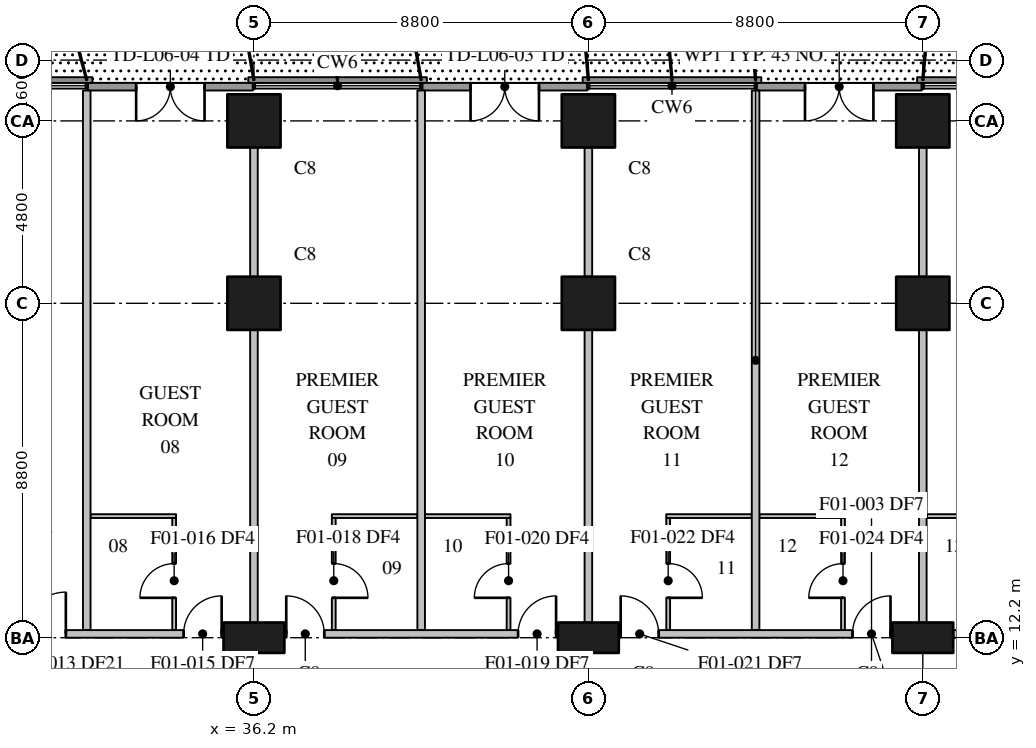
"""IFC4 building model, lengths in metres.
Left out: names, types, materials, properties, quantities, classifications, styles, units other than length and angle.
Written with IfcOpenShell. Run it as: python <this file> out.ifc"""

import sys

from ifc_helpers import new_model, si_unit, direction, frame, frame_2d, origin, origin_2d, place, context, subcontext, project, spatial, rectangle, extrude, element, fill, save


model = new_model("IFC4")
c1 = context("Model", 3, precision=1e-05, world=origin(), true_north=direction((0.0, 1.0)))
c2 = subcontext(c1, "Body", "Model", "MODEL_VIEW")
j1 = project(units=[si_unit("LENGTHUNIT", "METRE"), si_unit("PLANEANGLEUNIT", "RADIAN")], contexts=[c1])
p1 = place(None, origin())
s1 = spatial("IfcSite", under=j1, at=p1, CompositionType="ELEMENT")
p2 = place(p1, origin())
s2 = spatial("IfcBuilding", under=s1, at=p2, CompositionType="ELEMENT")
p3 = place(p2, frame((0.0, 0.0, 34.0)))
s3 = spatial("IfcBuildingStorey", under=s2, at=p3, CompositionType="ELEMENT", Elevation=34.0)
p4 = place(p3, frame((36.2, 12.2, 0.0), z_axis=(0.0, 0.0, 1.0), x_axis=(1.0, 0.0, 0.0)))
e1 = element("IfcColumn", 1, at=p4, inside=s3, PredefinedType="COLUMN", context=c2, shape_type="SweptSolid", body=[
    extrude(rectangle(XDim=1.6, YDim=0.8, at=origin_2d()), origin(), (0.0, 0.0, 1.0), 3.7),
])
for number, where, z_axis, x_axis in (
    (2, (36.2, 21.0, 0.0), (0.0, 0.0, 1.0), (1.0, 0.0, 0.0)),
    (3, (36.2, 25.8, 0.0), (0.0, 0.0, 1.0), (1.0, 0.0, 0.0)),
):
    element("IfcColumn", number, at=place(p3, frame(where, z_axis=z_axis, x_axis=x_axis)), inside=s3, PredefinedType="COLUMN", context=c2, shape_type="SweptSolid", body=[
        extrude(rectangle(XDim=1.4, YDim=1.4, at=origin_2d()), origin(), (0.0, 0.0, 1.0), 3.7),
    ])
p5 = place(p3, frame((45.0, 12.2, 0.0), z_axis=(0.0, 0.0, 1.0), x_axis=(1.0, 0.0, 0.0)))
e4 = element("IfcColumn", 4, at=p5, inside=s3, PredefinedType="COLUMN", context=c2, shape_type="SweptSolid", body=[
    extrude(rectangle(XDim=1.6, YDim=0.8, at=origin_2d()), origin(), (0.0, 0.0, 1.0), 3.7),
])
for number, where, z_axis, x_axis in (
    (5, (45.0, 21.0, 0.0), (0.0, 0.0, 1.0), (1.0, 0.0, 0.0)),
    (6, (45.0, 25.8, 0.0), (0.0, 0.0, 1.0), (1.0, 0.0, 0.0)),
):
    element("IfcColumn", number, at=place(p3, frame(where, z_axis=z_axis, x_axis=x_axis)), inside=s3, PredefinedType="COLUMN", context=c2, shape_type="SweptSolid", body=[
        extrude(rectangle(XDim=1.4, YDim=1.4, at=origin_2d()), origin(), (0.0, 0.0, 1.0), 3.7),
    ])
p6 = place(p3, frame((53.8, 12.2, 0.0), z_axis=(0.0, 0.0, 1.0), x_axis=(1.0, 0.0, 0.0)))
e7 = element("IfcColumn", 7, at=p6, inside=s3, PredefinedType="COLUMN", context=c2, shape_type="SweptSolid", body=[
    extrude(rectangle(XDim=1.6, YDim=0.8, at=origin_2d()), origin(), (0.0, 0.0, 1.0), 3.7),
])
for number, where, z_axis, x_axis in (
    (8, (53.8, 21.0, 0.0), (0.0, 0.0, 1.0), (1.0, 0.0, 0.0)),
    (9, (53.8, 25.8, 0.0), (0.0, 0.0, 1.0), (1.0, 0.0, 0.0)),
):
    element("IfcColumn", number, at=place(p3, frame(where, z_axis=z_axis, x_axis=x_axis)), inside=s3, PredefinedType="COLUMN", context=c2, shape_type="SweptSolid", body=[
        extrude(rectangle(XDim=1.4, YDim=1.4, at=origin_2d()), origin(), (0.0, 0.0, 1.0), 3.7),
    ])
p7 = place(p3, frame((53.77, 26.7, 0.0), z_axis=(0.0, 0.0, 1.0), x_axis=(-1.0, 0.0, 0.0)))
e10 = element("IfcWall", 10, at=p7, inside=s3, PredefinedType="STANDARD", context=c2, shape_type="SweptSolid", body=[
    extrude(rectangle(XDim=4.34, YDim=0.2, at=frame_2d((2.17, 0.0))), origin(), (0.0, 0.0, 1.0), 3.4),
])
p8 = place(p7, frame((1.27, 0.0, 0.0)))
e11 = element("IfcOpeningElement", 11, at=p8, cuts=e10, PredefinedType="OPENING", context=c2, shape_type="SweptSolid", body=[
    extrude(rectangle(XDim=1.8, YDim=2.4, at=frame_2d((0.9, 1.2))), frame((0.0, 0.11, 0.0), z_axis=(0.0, -1.0, 0.0), x_axis=(1.0, 0.0, 0.0)), (0.0, 0.0, 1.0), 0.22),
])
p9 = place(p3, frame((44.97, 26.7, 0.0), z_axis=(0.0, 0.0, 1.0), x_axis=(-1.0, 0.0, 0.0)))
e12 = element("IfcWall", 12, at=p9, inside=s3, PredefinedType="STANDARD", context=c2, shape_type="SweptSolid", body=[
    extrude(rectangle(XDim=4.34, YDim=0.2, at=frame_2d((2.17, 0.0))), origin(), (0.0, 0.0, 1.0), 3.4),
])
p10 = place(p9, frame((1.27, 0.0, 0.0)))
e13 = element("IfcOpeningElement", 13, at=p10, cuts=e12, PredefinedType="OPENING", context=c2, shape_type="SweptSolid", body=[
    extrude(rectangle(XDim=1.8, YDim=2.4, at=frame_2d((0.9, 1.2))), frame((0.0, 0.11, 0.0), z_axis=(0.0, -1.0, 0.0), x_axis=(1.0, 0.0, 0.0)), (0.0, 0.0, 1.0), 0.22),
])
p11 = place(p3, frame((36.17, 26.7, 0.0), z_axis=(0.0, 0.0, 1.0), x_axis=(-1.0, 0.0, 0.0)))
e14 = element("IfcWall", 14, at=p11, inside=s3, PredefinedType="STANDARD", context=c2, shape_type="SweptSolid", body=[
    extrude(rectangle(XDim=4.34, YDim=0.2, at=frame_2d((2.17, 0.0))), origin(), (0.0, 0.0, 1.0), 3.4),
])
p12 = place(p11, frame((1.27, 0.0, 0.0)))
e15 = element("IfcOpeningElement", 15, at=p12, cuts=e14, PredefinedType="OPENING", context=c2, shape_type="SweptSolid", body=[
    extrude(rectangle(XDim=1.8, YDim=2.4, at=frame_2d((0.9, 1.2))), frame((0.0, 0.11, 0.0), z_axis=(0.0, -1.0, 0.0), x_axis=(1.0, 0.0, 0.0)), (0.0, 0.0, 1.0), 0.22),
])
p13 = place(p3, frame((49.4, 12.4, 0.0), z_axis=(0.0, 0.0, 1.0), x_axis=(0.0, 1.0, 0.0)))
e16 = element("IfcWall", 16, at=p13, inside=s3, PredefinedType="PARTITIONING", context=c2, shape_type="SweptSolid", body=[
    extrude(rectangle(XDim=14.2, YDim=0.2, at=frame_2d((7.1, 0.0))), origin(), (0.0, 0.0, 1.0), 3.4),
])
p14 = place(p3, frame((53.8, 12.6, 0.0), z_axis=(0.0, 0.0, 1.0), x_axis=(0.0, 1.0, 0.0)))
e17 = element("IfcWall", 17, at=p14, inside=s3, PredefinedType="PARTITIONING", context=c2, shape_type="SweptSolid", body=[
    extrude(rectangle(XDim=7.7, YDim=0.2, at=frame_2d((3.85, 0.0))), origin(), (0.0, 0.0, 1.0), 3.4),
])
p15 = place(p3, frame((53.8, 21.7, 0.0), z_axis=(0.0, 0.0, 1.0), x_axis=(0.0, 1.0, 0.0)))
e18 = element("IfcWall", 18, at=p15, inside=s3, PredefinedType="PARTITIONING", context=c2, shape_type="SweptSolid", body=[
    extrude(rectangle(XDim=3.4, YDim=0.2, at=frame_2d((1.7, 0.0))), origin(), (0.0, 0.0, 1.0), 3.4),
])
p16 = place(p3, frame((28.0, 12.3, 0.0), z_axis=(0.0, 0.0, 1.0), x_axis=(1.0, 0.0, 0.0)))
e19 = element("IfcWall", 19, at=p16, inside=s3, PredefinedType="PARTITIONING", context=c2, shape_type="SweptSolid", body=[
    extrude(rectangle(XDim=7.4, YDim=0.2, at=frame_2d((3.7, 0.0))), origin(), (0.0, 0.0, 1.0), 3.4),
])
p17 = place(p16, frame((2.15, 0.0, 0.0)))
e20 = element("IfcOpeningElement", 20, at=p17, cuts=e19, PredefinedType="OPENING", context=c2, shape_type="SweptSolid", body=[
    extrude(rectangle(XDim=1.1, YDim=2.1, at=frame_2d((0.55, 1.05))), frame((0.0, 0.11, 0.0), z_axis=(0.0, -1.0, 0.0), x_axis=(1.0, 0.0, 0.0)), (0.0, 0.0, 1.0), 0.22),
])
p18 = place(p16, frame((6.35, 0.0, 0.0)))
e21 = element("IfcOpeningElement", 21, at=p18, cuts=e19, PredefinedType="OPENING", context=c2, shape_type="SweptSolid", body=[
    extrude(rectangle(XDim=1.0, YDim=2.1, at=frame_2d((0.5, 1.05))), frame((0.0, 0.11, 0.0), z_axis=(0.0, -1.0, 0.0), x_axis=(1.0, 0.0, 0.0)), (0.0, 0.0, 1.0), 0.22),
])
p19 = place(p3, frame((37.0, 12.3, 0.0), z_axis=(0.0, 0.0, 1.0), x_axis=(1.0, 0.0, 0.0)))
e22 = element("IfcWall", 22, at=p19, inside=s3, PredefinedType="PARTITIONING", context=c2, shape_type="SweptSolid", body=[
    extrude(rectangle(XDim=7.2, YDim=0.2, at=frame_2d((3.6, 0.0))), origin(), (0.0, 0.0, 1.0), 3.4),
])
p20 = place(p19, frame((0.05, 0.0, 0.0)))
e23 = element("IfcOpeningElement", 23, at=p20, cuts=e22, PredefinedType="OPENING", context=c2, shape_type="SweptSolid", body=[
    extrude(rectangle(XDim=1.0, YDim=2.1, at=frame_2d((0.5, 1.05))), frame((0.0, 0.11, 0.0), z_axis=(0.0, -1.0, 0.0), x_axis=(1.0, 0.0, 0.0)), (0.0, 0.0, 1.0), 0.22),
])
p21 = place(p19, frame((6.15, 0.0, 0.0)))
e24 = element("IfcOpeningElement", 24, at=p21, cuts=e22, PredefinedType="OPENING", context=c2, shape_type="SweptSolid", body=[
    extrude(rectangle(XDim=1.0, YDim=2.1, at=frame_2d((0.5, 1.05))), frame((0.0, 0.11, 0.0), z_axis=(0.0, -1.0, 0.0), x_axis=(1.0, 0.0, 0.0)), (0.0, 0.0, 1.0), 0.22),
])
p22 = place(p3, frame((45.8, 12.3, 0.0), z_axis=(0.0, 0.0, 1.0), x_axis=(1.0, 0.0, 0.0)))
e25 = element("IfcWall", 25, at=p22, inside=s3, PredefinedType="PARTITIONING", context=c2, shape_type="SweptSolid", body=[
    extrude(rectangle(XDim=7.2, YDim=0.2, at=frame_2d((3.6, 0.0))), origin(), (0.0, 0.0, 1.0), 3.4),
])
p23 = place(p22, frame((0.05, 0.0, 0.0)))
e26 = element("IfcOpeningElement", 26, at=p23, cuts=e25, PredefinedType="OPENING", context=c2, shape_type="SweptSolid", body=[
    extrude(rectangle(XDim=1.0, YDim=2.1, at=frame_2d((0.5, 1.05))), frame((0.0, 0.11, 0.0), z_axis=(0.0, -1.0, 0.0), x_axis=(1.0, 0.0, 0.0)), (0.0, 0.0, 1.0), 0.22),
])
p24 = place(p22, frame((6.15, 0.0, 0.0)))
e27 = element("IfcOpeningElement", 27, at=p24, cuts=e25, PredefinedType="OPENING", context=c2, shape_type="SweptSolid", body=[
    extrude(rectangle(XDim=1.0, YDim=2.1, at=frame_2d((0.5, 1.05))), frame((0.0, 0.11, 0.0), z_axis=(0.0, -1.0, 0.0), x_axis=(1.0, 0.0, 0.0)), (0.0, 0.0, 1.0), 0.22),
])
p25 = place(p3, frame((54.6, 12.3, 0.0), z_axis=(0.0, 0.0, 1.0), x_axis=(1.0, 0.0, 0.0)))
e28 = element("IfcWall", 28, at=p25, inside=s3, PredefinedType="PARTITIONING", context=c2, shape_type="SweptSolid", body=[
    extrude(rectangle(XDim=3.2, YDim=0.2, at=frame_2d((1.6, 0.0))), origin(), (0.0, 0.0, 1.0), 3.4),
])
p26 = place(p25, frame((1.85, 0.0, 0.0)))
e29 = element("IfcOpeningElement", 29, at=p26, cuts=e28, PredefinedType="OPENING", context=c2, shape_type="SweptSolid", body=[
    extrude(rectangle(XDim=1.0, YDim=2.1, at=frame_2d((0.5, 1.05))), frame((0.0, 0.11, 0.0), z_axis=(0.0, -1.0, 0.0), x_axis=(1.0, 0.0, 0.0)), (0.0, 0.0, 1.0), 0.22),
])
p27 = place(p3, frame((31.8, 12.4, 0.0), z_axis=(0.0, 0.0, 1.0), x_axis=(0.0, 1.0, 0.0)))
e30 = element("IfcWall", 30, at=p27, inside=s3, PredefinedType="PARTITIONING", context=c2, shape_type="SweptSolid", body=[
    extrude(rectangle(XDim=14.2, YDim=0.2, at=frame_2d((7.1, 0.0))), origin(), (0.0, 0.0, 1.0), 3.4),
])
p28 = place(p3, frame((36.2, 12.6, 0.0), z_axis=(0.0, 0.0, 1.0), x_axis=(0.0, 1.0, 0.0)))
e31 = element("IfcWall", 31, at=p28, inside=s3, PredefinedType="PARTITIONING", context=c2, shape_type="SweptSolid", body=[
    extrude(rectangle(XDim=7.7, YDim=0.2, at=frame_2d((3.85, 0.0))), origin(), (0.0, 0.0, 1.0), 3.4),
])
p29 = place(p3, frame((36.2, 21.7, 0.0), z_axis=(0.0, 0.0, 1.0), x_axis=(0.0, 1.0, 0.0)))
e32 = element("IfcWall", 32, at=p29, inside=s3, PredefinedType="PARTITIONING", context=c2, shape_type="SweptSolid", body=[
    extrude(rectangle(XDim=3.4, YDim=0.2, at=frame_2d((1.7, 0.0))), origin(), (0.0, 0.0, 1.0), 3.4),
])
p30 = place(p3, frame((40.6, 12.4, 0.0), z_axis=(0.0, 0.0, 1.0), x_axis=(0.0, 1.0, 0.0)))
e33 = element("IfcWall", 33, at=p30, inside=s3, PredefinedType="PARTITIONING", context=c2, shape_type="SweptSolid", body=[
    extrude(rectangle(XDim=14.2, YDim=0.2, at=frame_2d((7.1, 0.0))), origin(), (0.0, 0.0, 1.0), 3.4),
])
p31 = place(p3, frame((45.0, 12.6, 0.0), z_axis=(0.0, 0.0, 1.0), x_axis=(0.0, 1.0, 0.0)))
e34 = element("IfcWall", 34, at=p31, inside=s3, PredefinedType="PARTITIONING", context=c2, shape_type="SweptSolid", body=[
    extrude(rectangle(XDim=7.7, YDim=0.2, at=frame_2d((3.85, 0.0))), origin(), (0.0, 0.0, 1.0), 3.4),
])
p32 = place(p3, frame((45.0, 21.7, 0.0), z_axis=(0.0, 0.0, 1.0), x_axis=(0.0, 1.0, 0.0)))
e35 = element("IfcWall", 35, at=p32, inside=s3, PredefinedType="PARTITIONING", context=c2, shape_type="SweptSolid", body=[
    extrude(rectangle(XDim=3.4, YDim=0.2, at=frame_2d((1.7, 0.0))), origin(), (0.0, 0.0, 1.0), 3.4),
])
p33 = place(p3, frame((47.1, 15.35, 0.0), z_axis=(0.0, 0.0, 1.0), x_axis=(0.0, -1.0, 0.0)))
e36 = element("IfcWall", 36, at=p33, inside=s3, PredefinedType="PARTITIONING", context=c2, shape_type="SweptSolid", body=[
    extrude(rectangle(XDim=2.95, YDim=0.1, at=frame_2d((1.475, 0.0))), origin(), (0.0, 0.0, 1.0), 3.4),
])
p34 = place(p33, frame((1.2, 0.0, 0.0)))
e37 = element("IfcOpeningElement", 37, at=p34, cuts=e36, PredefinedType="OPENING", context=c2, shape_type="SweptSolid", body=[
    extrude(rectangle(XDim=0.9, YDim=2.1, at=frame_2d((0.45, 1.05))), frame((0.0, 0.06, 0.0), z_axis=(0.0, -1.0, 0.0), x_axis=(1.0, 0.0, 0.0)), (0.0, 0.0, 1.0), 0.12),
])
p35 = place(p3, frame((51.7, 12.4, 0.0), z_axis=(0.0, 0.0, 1.0), x_axis=(0.0, 1.0, 0.0)))
e38 = element("IfcWall", 38, at=p35, inside=s3, PredefinedType="PARTITIONING", context=c2, shape_type="SweptSolid", body=[
    extrude(rectangle(XDim=2.95, YDim=0.1, at=frame_2d((1.475, 0.0))), origin(), (0.0, 0.0, 1.0), 3.4),
])
p36 = place(p35, frame((0.85, 0.0, 0.0)))
e39 = element("IfcOpeningElement", 39, at=p36, cuts=e38, PredefinedType="OPENING", context=c2, shape_type="SweptSolid", body=[
    extrude(rectangle(XDim=0.9, YDim=2.1, at=frame_2d((0.45, 1.05))), frame((0.0, 0.06, 0.0), z_axis=(0.0, -1.0, 0.0), x_axis=(1.0, 0.0, 0.0)), (0.0, 0.0, 1.0), 0.12),
])
for number, where, z_axis, x_axis in (
    (40, (31.9, 15.4, 0.0), (0.0, 0.0, 1.0), (1.0, 0.0, 0.0)),
    (41, (38.25, 15.4, 0.0), (0.0, 0.0, 1.0), (1.0, 0.0, 0.0)),
    (42, (40.7, 15.4, 0.0), (0.0, 0.0, 1.0), (1.0, 0.0, 0.0)),
    (43, (47.05, 15.4, 0.0), (0.0, 0.0, 1.0), (1.0, 0.0, 0.0)),
    (44, (49.5, 15.4, 0.0), (0.0, 0.0, 1.0), (1.0, 0.0, 0.0)),
    (45, (53.9, 15.4, 0.0), (0.0, 0.0, 1.0), (1.0, 0.0, 0.0)),
):
    element("IfcWall", number, at=place(p3, frame(where, z_axis=z_axis, x_axis=x_axis)), inside=s3, PredefinedType="PARTITIONING", context=c2, shape_type="SweptSolid", body=[
        extrude(rectangle(XDim=2.25, YDim=0.1, at=frame_2d((1.125, 0.0))), origin(), (0.0, 0.0, 1.0), 3.4),
    ])
p37 = place(p3, frame((34.1, 12.4, 0.0), z_axis=(0.0, 0.0, 1.0), x_axis=(0.0, 1.0, 0.0)))
e46 = element("IfcWall", 46, at=p37, inside=s3, PredefinedType="PARTITIONING", context=c2, shape_type="SweptSolid", body=[
    extrude(rectangle(XDim=2.95, YDim=0.1, at=frame_2d((1.475, 0.0))), origin(), (0.0, 0.0, 1.0), 3.4),
])
p38 = place(p37, frame((0.85, 0.0, 0.0)))
e47 = element("IfcOpeningElement", 47, at=p38, cuts=e46, PredefinedType="OPENING", context=c2, shape_type="SweptSolid", body=[
    extrude(rectangle(XDim=0.9, YDim=2.1, at=frame_2d((0.45, 1.05))), frame((0.0, 0.06, 0.0), z_axis=(0.0, -1.0, 0.0), x_axis=(1.0, 0.0, 0.0)), (0.0, 0.0, 1.0), 0.12),
])
p39 = place(p3, frame((38.3, 15.35, 0.0), z_axis=(0.0, 0.0, 1.0), x_axis=(0.0, -1.0, 0.0)))
e48 = element("IfcWall", 48, at=p39, inside=s3, PredefinedType="PARTITIONING", context=c2, shape_type="SweptSolid", body=[
    extrude(rectangle(XDim=2.95, YDim=0.1, at=frame_2d((1.475, 0.0))), origin(), (0.0, 0.0, 1.0), 3.4),
])
p40 = place(p39, frame((1.2, 0.0, 0.0)))
e49 = element("IfcOpeningElement", 49, at=p40, cuts=e48, PredefinedType="OPENING", context=c2, shape_type="SweptSolid", body=[
    extrude(rectangle(XDim=0.9, YDim=2.1, at=frame_2d((0.45, 1.05))), frame((0.0, 0.06, 0.0), z_axis=(0.0, -1.0, 0.0), x_axis=(1.0, 0.0, 0.0)), (0.0, 0.0, 1.0), 0.12),
])
p41 = place(p3, frame((42.9, 12.4, 0.0), z_axis=(0.0, 0.0, 1.0), x_axis=(0.0, 1.0, 0.0)))
e50 = element("IfcWall", 50, at=p41, inside=s3, PredefinedType="PARTITIONING", context=c2, shape_type="SweptSolid", body=[
    extrude(rectangle(XDim=2.95, YDim=0.1, at=frame_2d((1.475, 0.0))), origin(), (0.0, 0.0, 1.0), 3.4),
])
p42 = place(p41, frame((0.85, 0.0, 0.0)))
e51 = element("IfcOpeningElement", 51, at=p42, cuts=e50, PredefinedType="OPENING", context=c2, shape_type="SweptSolid", body=[
    extrude(rectangle(XDim=0.9, YDim=2.1, at=frame_2d((0.45, 1.05))), frame((0.0, 0.06, 0.0), z_axis=(0.0, -1.0, 0.0), x_axis=(1.0, 0.0, 0.0)), (0.0, 0.0, 1.0), 0.12),
])
p43 = place(p8, origin())
e52 = element("IfcDoor", 52, at=p43, inside=s3, OperationType="SINGLE_SWING_LEFT", PredefinedType="DOOR", context=c2, shape_type="SweptSolid", body=[
    extrude(rectangle(XDim=1.8, YDim=2.4, at=frame_2d((0.9, 1.2))), frame((0.0, 0.025, 0.0), z_axis=(0.0, -1.0, 0.0), x_axis=(1.0, 0.0, 0.0)), (0.0, 0.0, 1.0), 0.05),
])
fill(e11, e52)
p44 = place(p10, origin())
e53 = element("IfcDoor", 53, at=p44, inside=s3, OperationType="SINGLE_SWING_LEFT", PredefinedType="DOOR", context=c2, shape_type="SweptSolid", body=[
    extrude(rectangle(XDim=1.8, YDim=2.4, at=frame_2d((0.9, 1.2))), frame((0.0, 0.025, 0.0), z_axis=(0.0, -1.0, 0.0), x_axis=(1.0, 0.0, 0.0)), (0.0, 0.0, 1.0), 0.05),
])
fill(e13, e53)
p45 = place(p12, origin())
e54 = element("IfcDoor", 54, at=p45, inside=s3, OperationType="SINGLE_SWING_LEFT", PredefinedType="DOOR", context=c2, shape_type="SweptSolid", body=[
    extrude(rectangle(XDim=1.8, YDim=2.4, at=frame_2d((0.9, 1.2))), frame((0.0, 0.025, 0.0), z_axis=(0.0, -1.0, 0.0), x_axis=(1.0, 0.0, 0.0)), (0.0, 0.0, 1.0), 0.05),
])
fill(e15, e54)
p46 = place(p17, origin())
e55 = element("IfcDoor", 55, at=p46, inside=s3, OperationType="SINGLE_SWING_RIGHT", PredefinedType="DOOR", context=c2, shape_type="SweptSolid", body=[
    extrude(rectangle(XDim=1.1, YDim=2.1, at=frame_2d((0.55, 1.05))), frame((0.0, 0.025, 0.0), z_axis=(0.0, -1.0, 0.0), x_axis=(1.0, 0.0, 0.0)), (0.0, 0.0, 1.0), 0.05),
])
fill(e20, e55)
p47 = place(p18, origin())
e56 = element("IfcDoor", 56, at=p47, inside=s3, OperationType="SINGLE_SWING_RIGHT", PredefinedType="DOOR", context=c2, shape_type="SweptSolid", body=[
    extrude(rectangle(XDim=1.0, YDim=2.1, at=frame_2d((0.5, 1.05))), frame((0.0, 0.025, 0.0), z_axis=(0.0, -1.0, 0.0), x_axis=(1.0, 0.0, 0.0)), (0.0, 0.0, 1.0), 0.05),
])
fill(e21, e56)
p48 = place(p38, origin())
e57 = element("IfcDoor", 57, at=p48, inside=s3, OperationType="SINGLE_SWING_LEFT", PredefinedType="DOOR", context=c2, shape_type="SweptSolid", body=[
    extrude(rectangle(XDim=0.9, YDim=2.1, at=frame_2d((0.45, 1.05))), frame((0.0, 0.025, 0.0), z_axis=(0.0, -1.0, 0.0), x_axis=(1.0, 0.0, 0.0)), (0.0, 0.0, 1.0), 0.05),
])
fill(e47, e57)
p49 = place(p20, origin())
e58 = element("IfcDoor", 58, at=p49, inside=s3, OperationType="SINGLE_SWING_LEFT", PredefinedType="DOOR", context=c2, shape_type="SweptSolid", body=[
    extrude(rectangle(XDim=1.0, YDim=2.1, at=frame_2d((0.5, 1.05))), frame((0.0, 0.025, 0.0), z_axis=(0.0, -1.0, 0.0), x_axis=(1.0, 0.0, 0.0)), (0.0, 0.0, 1.0), 0.05),
])
fill(e23, e58)
p50 = place(p40, origin())
e59 = element("IfcDoor", 59, at=p50, inside=s3, OperationType="SINGLE_SWING_RIGHT", PredefinedType="DOOR", context=c2, shape_type="SweptSolid", body=[
    extrude(rectangle(XDim=0.9, YDim=2.1, at=frame_2d((0.45, 1.05))), frame((0.0, 0.025, 0.0), z_axis=(0.0, -1.0, 0.0), x_axis=(1.0, 0.0, 0.0)), (0.0, 0.0, 1.0), 0.05),
])
fill(e49, e59)
p51 = place(p21, origin())
e60 = element("IfcDoor", 60, at=p51, inside=s3, OperationType="SINGLE_SWING_RIGHT", PredefinedType="DOOR", context=c2, shape_type="SweptSolid", body=[
    extrude(rectangle(XDim=1.0, YDim=2.1, at=frame_2d((0.5, 1.05))), frame((0.0, 0.025, 0.0), z_axis=(0.0, -1.0, 0.0), x_axis=(1.0, 0.0, 0.0)), (0.0, 0.0, 1.0), 0.05),
])
fill(e24, e60)
p52 = place(p42, origin())
e61 = element("IfcDoor", 61, at=p52, inside=s3, OperationType="SINGLE_SWING_LEFT", PredefinedType="DOOR", context=c2, shape_type="SweptSolid", body=[
    extrude(rectangle(XDim=0.9, YDim=2.1, at=frame_2d((0.45, 1.05))), frame((0.0, 0.025, 0.0), z_axis=(0.0, -1.0, 0.0), x_axis=(1.0, 0.0, 0.0)), (0.0, 0.0, 1.0), 0.05),
])
fill(e51, e61)
p53 = place(p23, origin())
e62 = element("IfcDoor", 62, at=p53, inside=s3, OperationType="SINGLE_SWING_LEFT", PredefinedType="DOOR", context=c2, shape_type="SweptSolid", body=[
    extrude(rectangle(XDim=1.0, YDim=2.1, at=frame_2d((0.5, 1.05))), frame((0.0, 0.025, 0.0), z_axis=(0.0, -1.0, 0.0), x_axis=(1.0, 0.0, 0.0)), (0.0, 0.0, 1.0), 0.05),
])
fill(e26, e62)
p54 = place(p34, origin())
e63 = element("IfcDoor", 63, at=p54, inside=s3, OperationType="SINGLE_SWING_RIGHT", PredefinedType="DOOR", context=c2, shape_type="SweptSolid", body=[
    extrude(rectangle(XDim=0.9, YDim=2.1, at=frame_2d((0.45, 1.05))), frame((0.0, 0.025, 0.0), z_axis=(0.0, -1.0, 0.0), x_axis=(1.0, 0.0, 0.0)), (0.0, 0.0, 1.0), 0.05),
])
fill(e37, e63)
p55 = place(p24, origin())
e64 = element("IfcDoor", 64, at=p55, inside=s3, OperationType="SINGLE_SWING_RIGHT", PredefinedType="DOOR", context=c2, shape_type="SweptSolid", body=[
    extrude(rectangle(XDim=1.0, YDim=2.1, at=frame_2d((0.5, 1.05))), frame((0.0, 0.025, 0.0), z_axis=(0.0, -1.0, 0.0), x_axis=(1.0, 0.0, 0.0)), (0.0, 0.0, 1.0), 0.05),
])
fill(e27, e64)
p56 = place(p36, origin())
e65 = element("IfcDoor", 65, at=p56, inside=s3, OperationType="SINGLE_SWING_LEFT", PredefinedType="DOOR", context=c2, shape_type="SweptSolid", body=[
    extrude(rectangle(XDim=0.9, YDim=2.1, at=frame_2d((0.45, 1.05))), frame((0.0, 0.025, 0.0), z_axis=(0.0, -1.0, 0.0), x_axis=(1.0, 0.0, 0.0)), (0.0, 0.0, 1.0), 0.05),
])
fill(e39, e65)
save(model, sys.argv[1])
